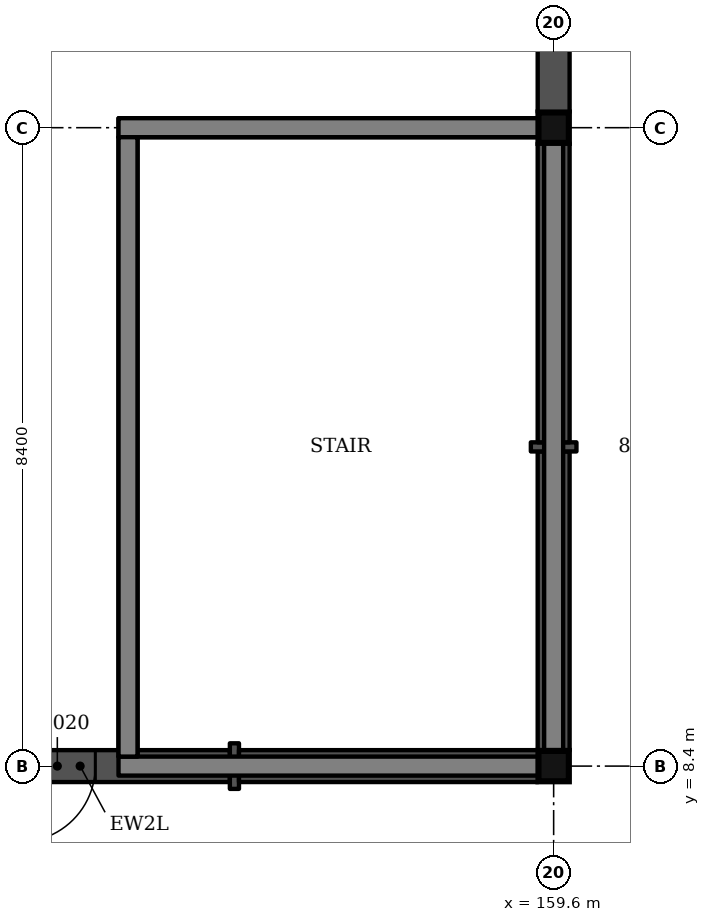
"""IFC4 building model, lengths in metres.
Left out: names, types, materials, properties, quantities, classifications, styles, units other than length and angle.
Written with IfcOpenShell. Run it as: python <this file> out.ifc"""

import sys

from ifc_helpers import new_model, si_unit, direction, frame, frame_2d, origin, origin_2d, place, context, subcontext, project, spatial, rectangle, extrude, element, fill, save


model = new_model("IFC4")
c1 = context("Model", 3, precision=1e-05, world=origin(), true_north=direction((0.0, 1.0)))
c2 = subcontext(c1, "Body", "Model", "MODEL_VIEW")
j1 = project(units=[si_unit("LENGTHUNIT", "METRE"), si_unit("PLANEANGLEUNIT", "RADIAN")], contexts=[c1])
p1 = place(None, origin())
s1 = spatial("IfcSite", under=j1, at=p1, CompositionType="ELEMENT")
p2 = place(p1, origin())
s2 = spatial("IfcBuilding", under=s1, at=p2, CompositionType="ELEMENT")
p3 = place(p2, origin())
s3 = spatial("IfcBuildingStorey", under=s2, at=p3, CompositionType="ELEMENT", Elevation=0.0)
for number, where, z_axis, x_axis in (
    (1, (159.6, 8.4, -1.5), (0.0, 0.0, 1.0), (1.0, 0.0, 0.0)),
    (2, (159.6, 16.8, -1.5), (0.0, 0.0, 1.0), (1.0, 0.0, 0.0)),
):
    element("IfcColumn", number, at=place(p3, frame(where, z_axis=z_axis, x_axis=x_axis)), inside=s3, PredefinedType="COLUMN", context=c2, shape_type="SweptSolid", body=[
        extrude(rectangle(XDim=0.4, YDim=0.4, at=origin_2d()), origin(), (0.0, 0.0, 1.0), 6.0),
    ])
p4 = place(p3, frame((153.875, 16.8, 0.0), z_axis=(0.0, 0.0, 1.0), x_axis=(1.0, 0.0, 0.0)))
e3 = element("IfcWall", 3, at=p4, inside=s3, PredefinedType="SHEAR", context=c2, shape_type="SweptSolid", body=[
    extrude(rectangle(XDim=5.525, YDim=0.25, at=frame_2d((2.762, 0.0))), origin(), (0.0, 0.0, 1.0), 4.5),
])
p5 = place(p3, frame((154.0, 8.525, 0.0), z_axis=(0.0, 0.0, 1.0), x_axis=(0.0, 1.0, 0.0)))
e4 = element("IfcWall", 4, at=p5, inside=s3, PredefinedType="SHEAR", context=c2, shape_type="SweptSolid", body=[
    extrude(rectangle(XDim=8.15, YDim=0.25, at=frame_2d((4.075, 0.0))), origin(), (0.0, 0.0, 1.0), 4.5),
])
for number, where, z_axis, x_axis in (
    (5, (153.875, 8.4, -1.5), (0.0, 0.0, 1.0), (1.0, 0.0, 0.0)),
    (6, (153.875, 16.8, -1.5), (0.0, 0.0, 1.0), (1.0, 0.0, 0.0)),
):
    element("IfcWall", number, at=place(p3, frame(where, z_axis=z_axis, x_axis=x_axis)), inside=s3, PredefinedType="SHEAR", context=c2, shape_type="SweptSolid", body=[
        extrude(rectangle(XDim=5.85, YDim=0.25, at=frame_2d((2.925, 0.0))), origin(), (0.0, 0.0, 1.0), 1.5),
    ])
for number, where, z_axis, x_axis in (
    (7, (154.0, 8.525, -1.5), (0.0, 0.0, 1.0), (0.0, 1.0, 0.0)),
    (8, (159.6, 8.525, -1.5), (0.0, 0.0, 1.0), (0.0, 1.0, 0.0)),
):
    element("IfcWall", number, at=place(p3, frame(where, z_axis=z_axis, x_axis=x_axis)), inside=s3, PredefinedType="SHEAR", context=c2, shape_type="SweptSolid", body=[
        extrude(rectangle(XDim=8.15, YDim=0.25, at=frame_2d((4.075, 0.0))), origin(), (0.0, 0.0, 1.0), 1.5),
    ])
p6 = place(p3, frame((159.6, 8.6, 0.0), z_axis=(0.0, 0.0, 1.0), x_axis=(0.0, 1.0, 0.0)))
e9 = element("IfcWall", 9, at=p6, inside=s3, PredefinedType="SOLIDWALL", context=c2, shape_type="SweptSolid", body=[
    extrude(rectangle(XDim=3.94, YDim=0.42, at=frame_2d((1.97, 0.0))), origin(), (0.0, 0.0, 1.0), 3.75),
])
p7 = place(p3, frame((159.6, 12.54, 0.0), z_axis=(0.0, 0.0, 1.0), x_axis=(0.0, 1.0, 0.0)))
e10 = element("IfcWall", 10, at=p7, inside=s3, PredefinedType="SOLIDWALL", context=c2, shape_type="SweptSolid", body=[
    extrude(rectangle(XDim=0.12, YDim=0.6, at=frame_2d((0.06, 0.0))), origin(), (0.0, 0.0, 1.0), 3.75),
])
p8 = place(p3, frame((159.6, 12.66, 0.0), z_axis=(0.0, 0.0, 1.0), x_axis=(0.0, 1.0, 0.0)))
e11 = element("IfcWall", 11, at=p8, inside=s3, PredefinedType="SOLIDWALL", context=c2, shape_type="SweptSolid", body=[
    extrude(rectangle(XDim=3.94, YDim=0.42, at=frame_2d((1.97, 0.0))), origin(), (0.0, 0.0, 1.0), 3.75),
])
p9 = place(p3, frame((159.6, 17.0, 0.0), z_axis=(0.0, 0.0, 1.0), x_axis=(0.0, 1.0, 0.0)))
e12 = element("IfcWall", 12, at=p9, inside=s3, PredefinedType="SOLIDWALL", context=c2, shape_type="SweptSolid", body=[
    extrude(rectangle(XDim=3.94, YDim=0.42, at=frame_2d((1.97, 0.0))), origin(), (0.0, 0.0, 1.0), 3.75),
])
p10 = place(p9, frame((1.07, 0.0, 0.0)))
e13 = element("IfcOpeningElement", 13, at=p10, cuts=e12, PredefinedType="OPENING", context=c2, shape_type="SweptSolid", body=[
    extrude(rectangle(XDim=1.8, YDim=2.1, at=frame_2d((0.9, 1.05))), frame((0.0, 0.22, 0.0), z_axis=(0.0, -1.0, 0.0), x_axis=(1.0, 0.0, 0.0)), (0.0, 0.0, 1.0), 0.44),
])
p11 = place(p3, frame((151.4, 8.4, 0.0), z_axis=(0.0, 0.0, 1.0), x_axis=(1.0, 0.0, 0.0)))
e14 = element("IfcWall", 14, at=p11, inside=s3, PredefinedType="SOLIDWALL", context=c2, shape_type="SweptSolid", body=[
    extrude(rectangle(XDim=3.94, YDim=0.42, at=frame_2d((1.97, 0.0))), origin(), (0.0, 0.0, 1.0), 3.75),
])
p12 = place(p11, frame((1.17, 0.0, 0.0)))
e15 = element("IfcOpeningElement", 15, at=p12, cuts=e14, PredefinedType="OPENING", context=c2, shape_type="SweptSolid", body=[
    extrude(rectangle(XDim=1.0, YDim=2.1, at=frame_2d((0.5, 1.05))), frame((0.0, 0.22, 0.0), z_axis=(0.0, -1.0, 0.0), x_axis=(1.0, 0.0, 0.0)), (0.0, 0.0, 1.0), 0.44),
])
p13 = place(p3, frame((155.34, 8.4, 0.0), z_axis=(0.0, 0.0, 1.0), x_axis=(1.0, 0.0, 0.0)))
e16 = element("IfcWall", 16, at=p13, inside=s3, PredefinedType="SOLIDWALL", context=c2, shape_type="SweptSolid", body=[
    extrude(rectangle(XDim=0.12, YDim=0.6, at=frame_2d((0.06, 0.0))), origin(), (0.0, 0.0, 1.0), 3.75),
])
p14 = place(p3, frame((155.46, 8.4, 0.0), z_axis=(0.0, 0.0, 1.0), x_axis=(1.0, 0.0, 0.0)))
e17 = element("IfcWall", 17, at=p14, inside=s3, PredefinedType="SOLIDWALL", context=c2, shape_type="SweptSolid", body=[
    extrude(rectangle(XDim=3.94, YDim=0.42, at=frame_2d((1.97, 0.0))), origin(), (0.0, 0.0, 1.0), 3.75),
])
p15 = place(p12, origin())
e18 = element("IfcDoor", 18, at=p15, inside=s3, OperationType="SINGLE_SWING_LEFT", PredefinedType="DOOR", context=c2, shape_type="SweptSolid", body=[
    extrude(rectangle(XDim=1.0, YDim=2.1, at=frame_2d((0.5, 1.05))), frame((0.0, 0.025, 0.0), z_axis=(0.0, -1.0, 0.0), x_axis=(1.0, 0.0, 0.0)), (0.0, 0.0, 1.0), 0.05),
])
fill(e15, e18)
save(model, sys.argv[1])
